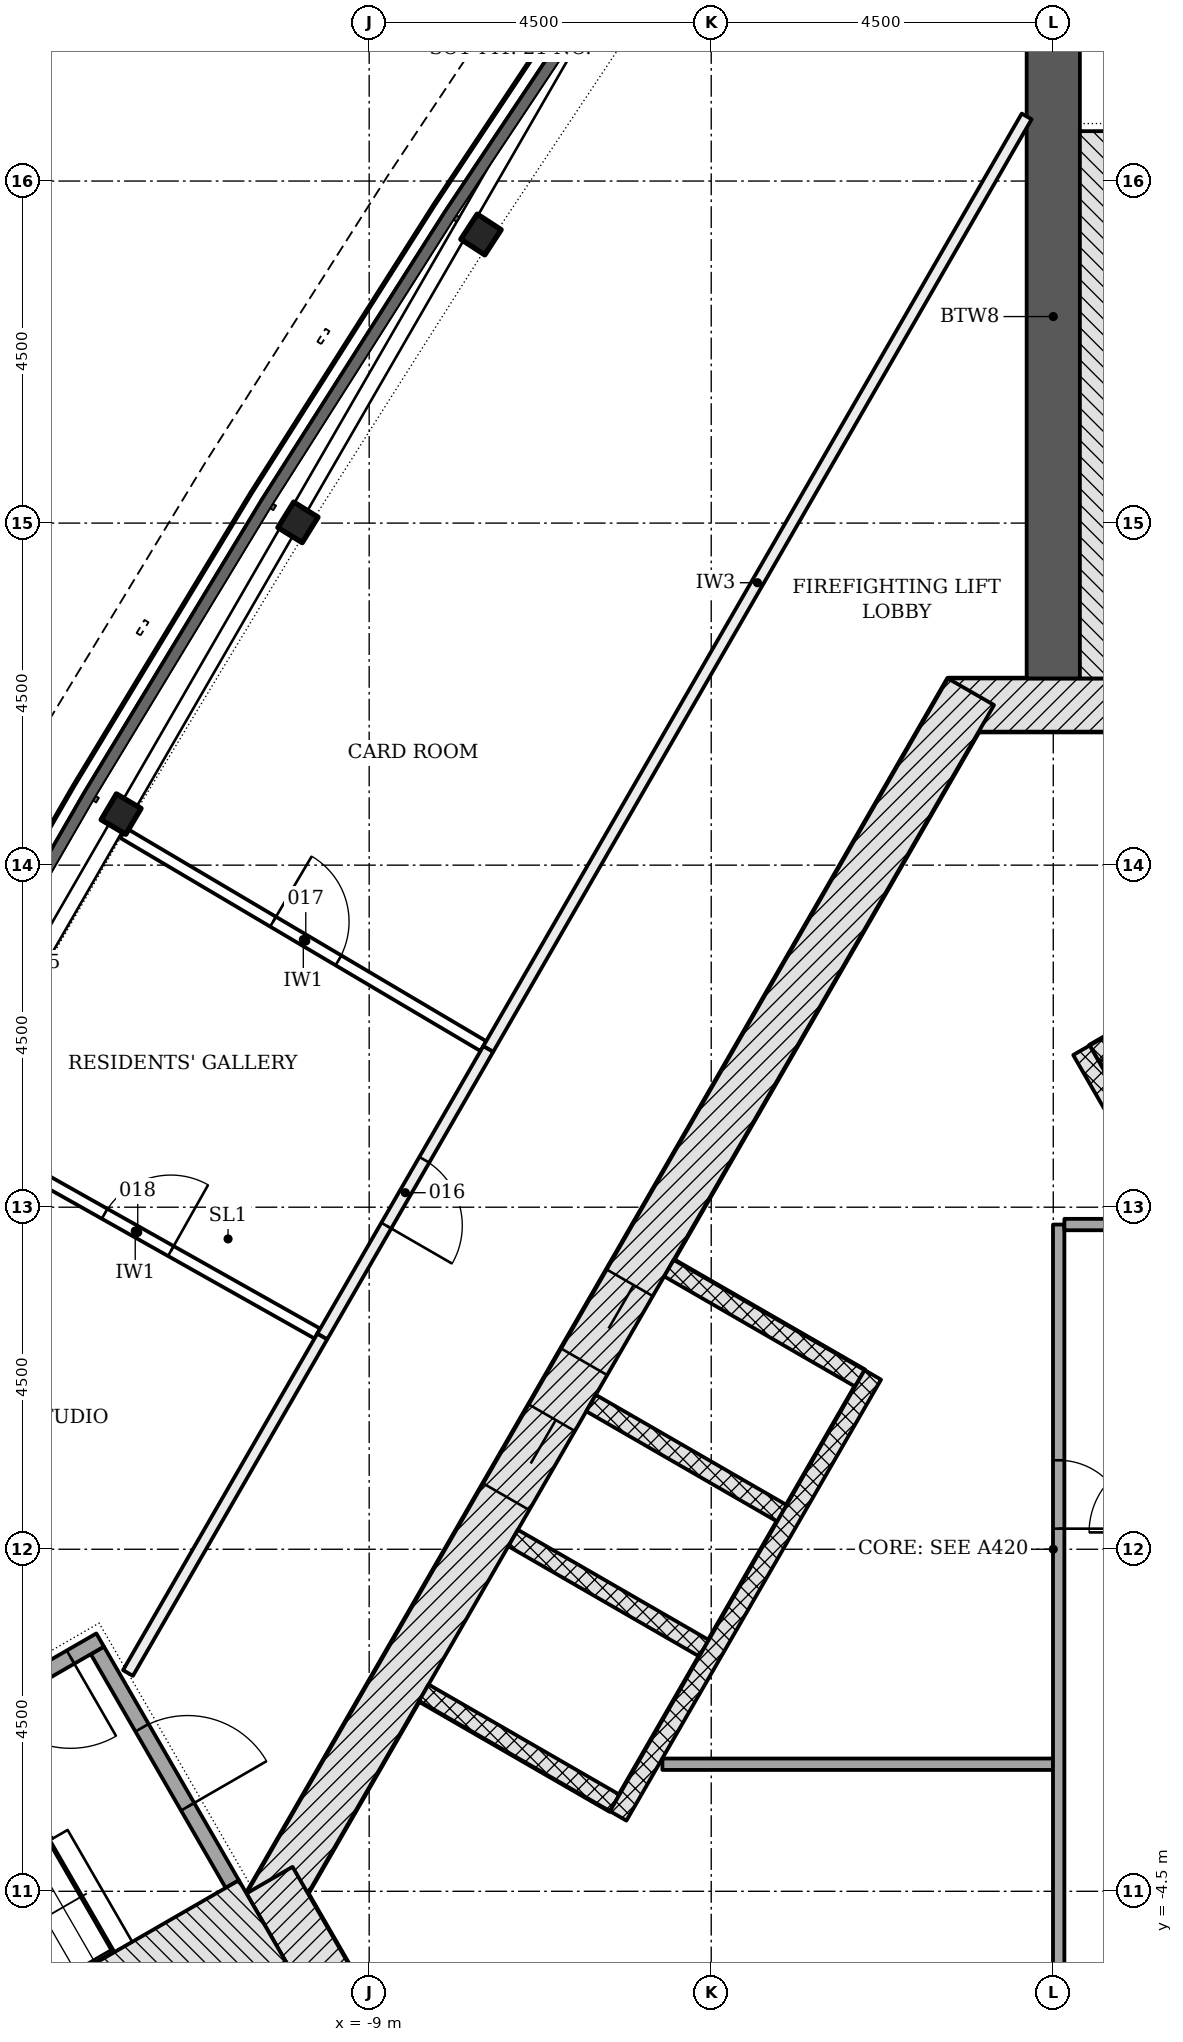
"""IFC4 building model, lengths in metres.
Left out: names, types, materials, properties, quantities, classifications, styles, units other than length and angle.
Written with IfcOpenShell. Run it as: python <this file> out.ifc"""

import sys

from ifc_helpers import new_model, si_unit, direction, frame, frame_2d, origin, origin_2d, place, context, subcontext, project, spatial, rectangle, i_section, extrude, element, fill, save


model = new_model("IFC4")
c1 = context("Model", 3, precision=1e-05, world=origin(), true_north=direction((0.0, 1.0)))
c2 = subcontext(c1, "Body", "Model", "MODEL_VIEW")
j1 = project(units=[si_unit("LENGTHUNIT", "METRE"), si_unit("PLANEANGLEUNIT", "RADIAN")], contexts=[c1])
p1 = place(None, origin())
s1 = spatial("IfcSite", under=j1, at=p1, CompositionType="ELEMENT")
p2 = place(p1, origin())
s2 = spatial("IfcBuilding", under=s1, at=p2, CompositionType="ELEMENT")
p3 = place(p2, frame((0.0, 0.0, 185.1)))
s3 = spatial("IfcBuildingStorey", under=s2, at=p3, CompositionType="ELEMENT", Elevation=185.1)
p4 = place(p3, frame((1.386, 11.106, -0.2), z_axis=(0.0, 0.0, 1.0), x_axis=(-1.0, 0.0, 0.0)))
e1 = element("IfcWall", 1, at=p4, inside=s3, PredefinedType="SHEAR", context=c2, shape_type="SweptSolid", body=[
    extrude(rectangle(XDim=2.771, YDim=0.7, at=frame_2d((1.386, 0.0))), origin(), (0.0, 0.0, 1.0), 3.6),
])
p5 = place(p3, frame((-1.083, 11.281, -0.2), z_axis=(0.0, 0.0, 1.0), x_axis=(-0.500001446645, -0.866024568562, 0.0)))
e2 = element("IfcWall", 2, at=p5, inside=s3, PredefinedType="SHEAR", context=c2, shape_type="SweptSolid", body=[
    extrude(rectangle(XDim=18.458, YDim=0.7, at=frame_2d((9.229, 0.0))), origin(), (0.0, 0.0, 1.0), 3.6),
])
p6 = place(p5, frame((8.979, 0.0, 0.2)))
e3 = element("IfcOpeningElement", 3, at=p6, cuts=e2, PredefinedType="OPENING", context=c2, shape_type="SweptSolid", body=[
    extrude(rectangle(XDim=1.2, YDim=2.1, at=frame_2d((0.6, 1.05))), frame((0.0, 0.36, 0.0), z_axis=(0.0, -1.0, 0.0), x_axis=(1.0, 0.0, 0.0)), (0.0, 0.0, 1.0), 0.72),
])
p7 = place(p5, frame((11.029, 0.0, 0.2)))
e4 = element("IfcOpeningElement", 4, at=p7, cuts=e2, PredefinedType="OPENING", context=c2, shape_type="SweptSolid", body=[
    extrude(rectangle(XDim=1.2, YDim=2.1, at=frame_2d((0.6, 1.05))), frame((0.0, 0.36, 0.0), z_axis=(0.0, -1.0, 0.0), x_axis=(1.0, 0.0, 0.0)), (0.0, 0.0, 1.0), 0.72),
])
p8 = place(p3, frame((-10.311, -4.353, -0.2), z_axis=(0.0, 0.0, 1.0), x_axis=(0.500042739161, -0.866000726912, 0.0)))
e5 = element("IfcWall", 5, at=p8, inside=s3, PredefinedType="SHEAR", context=c2, shape_type="SweptSolid", body=[
    extrude(rectangle(XDim=2.771, YDim=0.7, at=frame_2d((1.386, 0.0))), origin(), (0.0, 0.0, 1.0), 3.6),
])
p9 = place(p3, frame((0.0, 11.456, -0.2), z_axis=(0.0, 0.0, 1.0), x_axis=(0.0, 1.0, 0.0)))
e6 = element("IfcWall", 6, at=p9, inside=s3, PredefinedType="SHEAR", context=c2, shape_type="SweptSolid", body=[
    extrude(rectangle(XDim=9.522, YDim=0.7, at=frame_2d((4.761, 0.0))), origin(), (0.0, 0.0, 1.0), 3.6),
])
p10 = place(p3, frame((-9.922, -5.728, -0.2), z_axis=(0.0, 0.0, 1.0), x_axis=(-0.866025463095, -0.499999897272, 0.0)))
e7 = element("IfcWall", 7, at=p10, inside=s3, PredefinedType="SHEAR", context=c2, shape_type="SweptSolid", body=[
    extrude(rectangle(XDim=9.521, YDim=0.7, at=frame_2d((4.761, 0.0))), origin(), (0.0, 0.0, 1.0), 3.6),
])
for number, where, z_axis, x_axis in (
    (8, (-7.529, 17.297, -0.2), (0.0, 0.0, 1.0), (-0.546, -0.838, 0.0)),
    (9, (-9.937, 13.51, -0.2), (0.0, 0.0, 1.0), (-0.528, -0.85, 0.0)),
    (10, (-12.264, 9.672, -0.2), (0.0, 0.0, 1.0), (-0.509, -0.861, 0.0)),
):
    element("IfcColumn", number, at=place(p3, frame(where, z_axis=z_axis, x_axis=x_axis)), inside=s3, PredefinedType="COLUMN", context=c2, shape_type="SweptSolid", body=[
        extrude(i_section(OverallWidth=0.394, OverallDepth=0.376, WebThickness=0.017, FlangeThickness=0.028, FilletRadius=0.015, at=origin_2d()), origin(), (0.0, 0.0, 1.0), 3.6),
    ])
p11 = place(p3, frame((2.706, 7.769, -0.2), z_axis=(0.0, 0.0, 1.0), x_axis=(-0.866022959057, -0.500004234368, 0.0)))
e11 = element("IfcWall", 11, at=p11, inside=s3, PredefinedType="PARTITIONING", context=c2, shape_type="SweptSolid", body=[
    extrude(rectangle(XDim=2.5, YDim=0.25, at=frame_2d((1.25, 0.0))), origin(), (0.0, 0.0, 1.0), 3.6),
])
p12 = place(p3, frame((5.87, -2.961, 0.0), z_axis=(0.0, 0.0, 1.0), x_axis=(-0.50000615651, 0.866021849293, 0.0)))
e12 = element("IfcWall", 12, at=p12, inside=s3, PredefinedType="PARTITIONING", context=c2, shape_type="SweptSolid", body=[
    extrude(rectangle(XDim=11.0, YDim=0.25, at=frame_2d((5.5, 0.0))), origin(), (0.0, 0.0, 1.0), 3.4),
])
for number, where, z_axis, x_axis in (
    (13, (-5.056, 3.699, -0.2), (0.0, 0.0, 1.0), (0.866, -0.5, 0.0)),
    (14, (-6.081, 1.923, -0.2), (0.0, 0.0, 1.0), (0.866, -0.5, 0.0)),
    (15, (-7.106, 0.148, -0.2), (0.0, 0.0, 1.0), (0.866, -0.5, 0.0)),
    (16, (-8.281, -1.887, -0.2), (0.0, 0.0, 1.0), (0.866, -0.5, 0.0)),
):
    element("IfcWall", number, at=place(p3, frame(where, z_axis=z_axis, x_axis=x_axis)), inside=s3, PredefinedType="PARTITIONING", context=c2, shape_type="SweptSolid", body=[
        extrude(rectangle(XDim=2.9, YDim=0.25, at=frame_2d((1.45, 0.0))), origin(), (0.0, 0.0, 1.0), 3.6),
    ])
p13 = place(p3, frame((-2.374, 2.294, 0.0), z_axis=(0.0, 0.0, 1.0), x_axis=(-0.500003174267, -0.866023571113, 0.0)))
e17 = element("IfcWall", 17, at=p13, inside=s3, PredefinedType="PARTITIONING", context=c2, shape_type="SweptSolid", body=[
    extrude(rectangle(XDim=6.7, YDim=0.25, at=frame_2d((3.35, 0.0))), origin(), (0.0, 0.0, 1.0), 3.4),
])
p14 = place(p3, frame((-5.142, -2.828, 0.0), z_axis=(0.0, 0.0, 1.0), x_axis=(1.0, 0.0, 0.0)))
e18 = element("IfcWall", 18, at=p14, inside=s3, PredefinedType="PARTITIONING", context=c2, shape_type="SweptSolid", body=[
    extrude(rectangle(XDim=5.139, YDim=0.15, at=frame_2d((2.569, 0.0))), origin(), (0.0, 0.0, 1.0), 3.4),
])
p15 = place(p3, frame((0.071, 4.272, 0.0), z_axis=(0.0, 0.0, 1.0), x_axis=(0.0, -1.0, 0.0)))
e19 = element("IfcWall", 19, at=p15, inside=s3, PredefinedType="PARTITIONING", context=c2, shape_type="SweptSolid", body=[
    extrude(rectangle(XDim=10.5, YDim=0.15, at=frame_2d((5.25, 0.0))), origin(), (0.0, 0.0, 1.0), 3.4),
])
p16 = place(p15, frame((3.101, 0.0, 0.0)))
e20 = element("IfcOpeningElement", 20, at=p16, cuts=e19, PredefinedType="OPENING", context=c2, shape_type="SweptSolid", body=[
    extrude(rectangle(XDim=0.9, YDim=2.1, at=frame_2d((0.45, 1.05))), frame((0.0, 0.085, 0.0), z_axis=(0.0, -1.0, 0.0), x_axis=(1.0, 0.0, 0.0)), (0.0, 0.0, 1.0), 0.17),
])
p17 = place(p3, frame((0.146, 4.272, 0.0), z_axis=(0.0, 0.0, 1.0), x_axis=(1.0, 0.0, 0.0)))
e21 = element("IfcWall", 21, at=p17, inside=s3, PredefinedType="PARTITIONING", context=c2, shape_type="SweptSolid", body=[
    extrude(rectangle(XDim=1.25, YDim=0.15, at=frame_2d((0.625, 0.0))), origin(), (0.0, 0.0, 1.0), 3.4),
])
p18 = place(p3, frame((0.968, 11.456, -0.2), z_axis=(0.0, 0.0, 1.0), x_axis=(0.0, 1.0, 0.0)))
e22 = element("IfcWall", 22, at=p18, inside=s3, PredefinedType="SHEAR", context=c2, shape_type="SweptSolid", body=[
    extrude(rectangle(XDim=7.2, YDim=1.236, at=frame_2d((3.6, 0.0))), origin(), (0.0, 0.0, 1.0), 3.6),
])
p19 = place(p3, frame((-12.576, -1.331, -0.2), z_axis=(0.0, 0.0, 1.0), x_axis=(0.499970499736, -0.8660424351, 0.0)))
e23 = element("IfcWall", 23, at=p19, inside=s3, PredefinedType="SHEAR", context=c2, shape_type="SweptSolid", body=[
    extrude(rectangle(XDim=3.55, YDim=0.2, at=frame_2d((1.775, 0.0))), origin(), (0.0, 0.0, 1.0), 3.6),
])
p20 = place(p19, frame((1.175, 0.0, 0.2)))
e24 = element("IfcOpeningElement", 24, at=p20, cuts=e23, PredefinedType="OPENING", context=c2, shape_type="SweptSolid", body=[
    extrude(rectangle(XDim=1.2, YDim=2.1, at=frame_2d((0.6, 1.05))), frame((0.0, 0.11, 0.0), z_axis=(0.0, -1.0, 0.0), x_axis=(1.0, 0.0, 0.0)), (0.0, 0.0, 1.0), 0.22),
])
p21 = place(p3, frame((-12.539, -1.194, -0.2), z_axis=(0.0, 0.0, 1.0), x_axis=(-0.866045472092, -0.499965239061, 0.0)))
e25 = element("IfcWall", 25, at=p21, inside=s3, PredefinedType="SHEAR", context=c2, shape_type="SweptSolid", body=[
    extrude(rectangle(XDim=5.6, YDim=0.2, at=frame_2d((2.8, 0.0))), origin(), (0.0, 0.0, 1.0), 3.6),
])
p22 = place(p21, frame((0.45, 0.0, 0.2)))
e26 = element("IfcOpeningElement", 26, at=p22, cuts=e25, PredefinedType="OPENING", context=c2, shape_type="SweptSolid", body=[
    extrude(rectangle(XDim=1.2, YDim=2.1, at=frame_2d((0.6, 1.05))), frame((0.0, 0.11, 0.0), z_axis=(0.0, -1.0, 0.0), x_axis=(1.0, 0.0, 0.0)), (0.0, 0.0, 1.0), 0.22),
])
p23 = place(p3, frame((-10.406, -4.89, -0.2), z_axis=(0.0, 0.0, 1.0), x_axis=(-0.866018442252, -0.500012057535, 0.0)))
e27 = element("IfcWall", 27, at=p23, inside=s3, PredefinedType="SHEAR", context=c2, shape_type="SweptSolid", body=[
    extrude(rectangle(XDim=7.2, YDim=1.236, at=frame_2d((3.6, 0.0))), origin(), (0.0, 0.0, 1.0), 3.6),
])
p24 = place(p3, frame((-0.35, 18.85, 0.0), z_axis=(0.0, 0.0, 1.0), x_axis=(-0.500005388685, -0.866022292603, 0.0)))
e28 = element("IfcWall", 28, at=p24, inside=s3, PredefinedType="PARTITIONING", context=c2, shape_type="SweptSolid", body=[
    extrude(rectangle(XDim=14.167, YDim=0.15, at=frame_2d((7.083, 0.0))), origin(), (0.0, 0.0, 1.0), 2.847),
])
p25 = place(p3, frame((-9.616, 2.801, 0.0), z_axis=(0.0, 0.0, 1.0), x_axis=(-0.499995206172, -0.866028171485, 0.0)))
e29 = element("IfcWall", 29, at=p25, inside=s3, PredefinedType="PARTITIONING", context=c2, shape_type="SweptSolid", body=[
    extrude(rectangle(XDim=5.114, YDim=0.15, at=frame_2d((2.557, 0.0))), origin(), (0.0, 0.0, 1.0), 2.852),
])
p26 = place(p3, frame((-12.235, 9.422, 0.0), z_axis=(0.0, 0.0, 1.0), x_axis=(0.860631434237, -0.509228371562, 0.0)))
e30 = element("IfcWall", 30, at=p26, inside=s3, PredefinedType="PARTITIONING", context=c2, shape_type="SweptSolid", body=[
    extrude(rectangle(XDim=5.504, YDim=0.15, at=frame_2d((2.752, 0.0))), origin(), (0.0, 0.0, 1.0), 3.4),
])
p27 = place(p26, frame((2.29, 0.0, 0.0)))
e31 = element("IfcOpeningElement", 31, at=p27, cuts=e30, PredefinedType="OPENING", context=c2, shape_type="SweptSolid", body=[
    extrude(rectangle(XDim=1.0, YDim=2.1, at=frame_2d((0.5, 1.05))), frame((0.0, 0.085, 0.0), z_axis=(0.0, -1.0, 0.0), x_axis=(1.0, 0.0, 0.0)), (0.0, 0.0, 1.0), 0.17),
])
p28 = place(p3, frame((-14.474, 5.536, 0.0), z_axis=(0.0, 0.0, 1.0), x_axis=(0.871324088074, -0.490707992132, 0.0)))
e32 = element("IfcWall", 32, at=p28, inside=s3, PredefinedType="PARTITIONING", context=c2, shape_type="SweptSolid", body=[
    extrude(rectangle(XDim=5.5, YDim=0.15, at=frame_2d((2.75, 0.0))), origin(), (0.0, 0.0, 1.0), 3.4),
])
p29 = place(p28, frame((2.287, 0.0, 0.0)))
e33 = element("IfcOpeningElement", 33, at=p29, cuts=e32, PredefinedType="OPENING", context=c2, shape_type="SweptSolid", body=[
    extrude(rectangle(XDim=1.0, YDim=2.1, at=frame_2d((0.5, 1.05))), frame((0.0, 0.085, 0.0), z_axis=(0.0, -1.0, 0.0), x_axis=(1.0, 0.0, 0.0)), (0.0, 0.0, 1.0), 0.17),
])
p30 = place(p3, frame((-7.434, 6.581, 0.0), z_axis=(0.0, 0.0, 1.0), x_axis=(-0.499964504253, -0.866045896294, 0.0)))
e34 = element("IfcWall", 34, at=p30, inside=s3, PredefinedType="PARTITIONING", context=c2, shape_type="SweptSolid", body=[
    extrude(rectangle(XDim=4.365, YDim=0.15, at=frame_2d((2.183, 0.0))), origin(), (0.0, 0.0, 1.0), 2.847),
])
p31 = place(p30, frame((1.683, 0.0, 0.0)))
e35 = element("IfcOpeningElement", 35, at=p31, cuts=e34, PredefinedType="OPENING", context=c2, shape_type="SweptSolid", body=[
    extrude(rectangle(XDim=1.0, YDim=2.1, at=frame_2d((0.5, 1.05))), frame((0.0, 0.085, 0.0), z_axis=(0.0, -1.0, 0.0), x_axis=(1.0, 0.0, 0.0)), (0.0, 0.0, 1.0), 0.17),
])
p32 = place(p6, origin())
e36 = element("IfcDoor", 36, at=p32, inside=s3, OperationType="DOUBLE_DOOR_SLIDING", PredefinedType="DOOR", context=c2, shape_type="SweptSolid", body=[
    extrude(rectangle(XDim=1.2, YDim=2.1, at=frame_2d((0.6, 1.05))), frame((0.0, 0.025, 0.0), z_axis=(0.0, -1.0, 0.0), x_axis=(1.0, 0.0, 0.0)), (0.0, 0.0, 1.0), 0.05),
])
fill(e3, e36)
p33 = place(p7, origin())
e37 = element("IfcDoor", 37, at=p33, inside=s3, OperationType="DOUBLE_DOOR_SLIDING", PredefinedType="DOOR", context=c2, shape_type="SweptSolid", body=[
    extrude(rectangle(XDim=1.2, YDim=2.1, at=frame_2d((0.6, 1.05))), frame((0.0, 0.025, 0.0), z_axis=(0.0, -1.0, 0.0), x_axis=(1.0, 0.0, 0.0)), (0.0, 0.0, 1.0), 0.05),
])
fill(e4, e37)
p34 = place(p16, origin())
e38 = element("IfcDoor", 38, at=p34, inside=s3, OperationType="SINGLE_SWING_RIGHT", PredefinedType="DOOR", context=c2, shape_type="SweptSolid", body=[
    extrude(rectangle(XDim=0.9, YDim=2.1, at=frame_2d((0.45, 1.05))), frame((0.0, 0.025, 0.0), z_axis=(0.0, -1.0, 0.0), x_axis=(1.0, 0.0, 0.0)), (0.0, 0.0, 1.0), 0.05),
])
fill(e20, e38)
p35 = place(p20, origin())
e39 = element("IfcDoor", 39, at=p35, inside=s3, OperationType="SINGLE_SWING_RIGHT", PredefinedType="DOOR", context=c2, shape_type="SweptSolid", body=[
    extrude(rectangle(XDim=1.2, YDim=2.1, at=frame_2d((0.6, 1.05))), frame((0.0, 0.025, 0.0), z_axis=(0.0, -1.0, 0.0), x_axis=(1.0, 0.0, 0.0)), (0.0, 0.0, 1.0), 0.05),
])
fill(e24, e39)
p36 = place(p22, origin())
e40 = element("IfcDoor", 40, at=p36, inside=s3, OperationType="SINGLE_SWING_LEFT", PredefinedType="DOOR", context=c2, shape_type="SweptSolid", body=[
    extrude(rectangle(XDim=1.2, YDim=2.1, at=frame_2d((0.6, 1.05))), frame((0.0, 0.025, 0.0), z_axis=(0.0, -1.0, 0.0), x_axis=(1.0, 0.0, 0.0)), (0.0, 0.0, 1.0), 0.05),
])
fill(e26, e40)
p37 = place(p31, origin())
e41 = element("IfcDoor", 41, at=p37, inside=s3, OperationType="SINGLE_SWING_RIGHT", PredefinedType="DOOR", context=c2, shape_type="SweptSolid", body=[
    extrude(rectangle(XDim=1.0, YDim=2.1, at=frame_2d((0.5, 1.05))), frame((0.0, 0.025, 0.0), z_axis=(0.0, -1.0, 0.0), x_axis=(1.0, 0.0, 0.0)), (0.0, 0.0, 1.0), 0.05),
])
fill(e35, e41)
p38 = place(p27, origin())
e42 = element("IfcDoor", 42, at=p38, inside=s3, OperationType="SINGLE_SWING_LEFT", PredefinedType="DOOR", context=c2, shape_type="SweptSolid", body=[
    extrude(rectangle(XDim=1.0, YDim=2.1, at=frame_2d((0.5, 1.05))), frame((0.0, 0.025, 0.0), z_axis=(0.0, -1.0, 0.0), x_axis=(1.0, 0.0, 0.0)), (0.0, 0.0, 1.0), 0.05),
])
fill(e31, e42)
p39 = place(p29, origin())
e43 = element("IfcDoor", 43, at=p39, inside=s3, OperationType="SINGLE_SWING_RIGHT", PredefinedType="DOOR", context=c2, shape_type="SweptSolid", body=[
    extrude(rectangle(XDim=1.0, YDim=2.1, at=frame_2d((0.5, 1.05))), frame((0.0, 0.025, 0.0), z_axis=(0.0, -1.0, 0.0), x_axis=(1.0, 0.0, 0.0)), (0.0, 0.0, 1.0), 0.05),
])
fill(e33, e43)
save(model, sys.argv[1])
